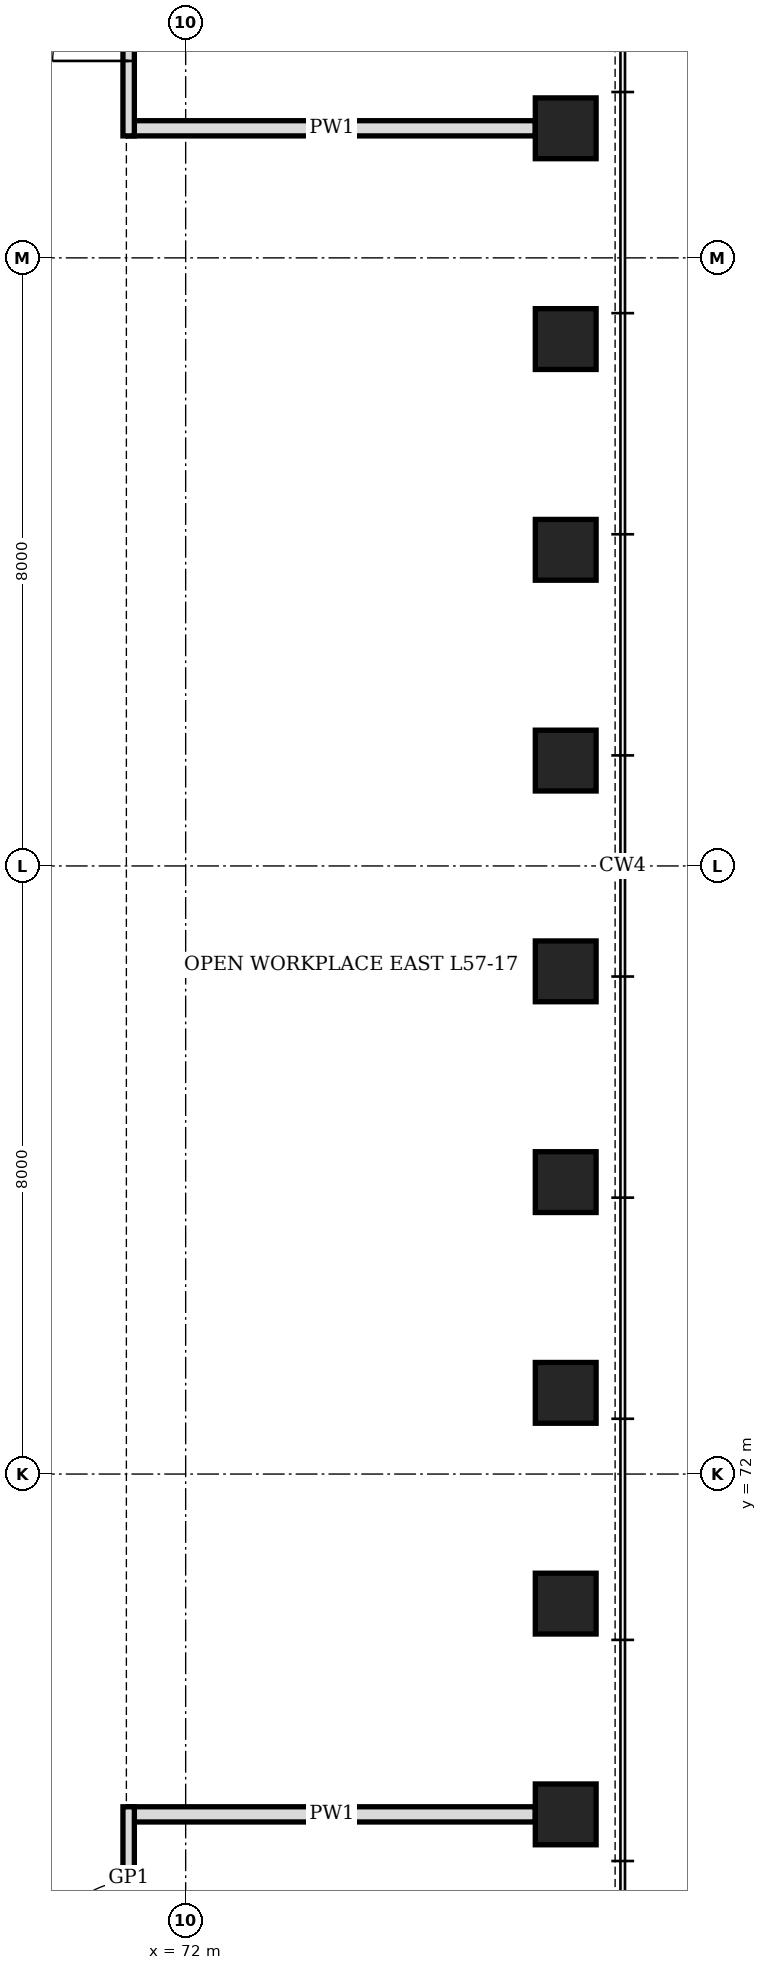
"""IFC4 building model, lengths in metres.
Left out: names, types, materials, properties, quantities, classifications, styles, units other than length and angle.
Written with IfcOpenShell. Run it as: python <this file> out.ifc"""

import sys

from ifc_helpers import new_model, si_unit, direction, frame, frame_2d, origin, origin_2d, place, context, subcontext, project, spatial, rectangle, hollow_rectangle, extrude, element, fill, save


model = new_model("IFC4")
c1 = context("Model", 3, precision=1e-05, world=origin(), true_north=direction((0.0, 1.0)))
c2 = subcontext(c1, "Body", "Model", "MODEL_VIEW")
j1 = project(units=[si_unit("LENGTHUNIT", "METRE"), si_unit("PLANEANGLEUNIT", "RADIAN")], contexts=[c1])
p1 = place(None, origin())
s1 = spatial("IfcSite", under=j1, at=p1, CompositionType="ELEMENT")
p2 = place(p1, origin())
s2 = spatial("IfcBuilding", under=s1, at=p2, CompositionType="ELEMENT")
p3 = place(p2, frame((0.0, 0.0, 254.5)))
s3 = spatial("IfcBuildingStorey", under=s2, at=p3, CompositionType="ELEMENT", Elevation=254.5)
for number, where, z_axis, x_axis in (
    (1, (77.0, 67.523, 0.0), (0.0, 0.0, 1.0), (0.0, 1.0, 0.0)),
    (2, (77.0, 70.295, 0.0), (0.0, 0.0, 1.0), (0.0, 1.0, 0.0)),
    (3, (77.0, 73.068, 0.0), (0.0, 0.0, 1.0), (0.0, 1.0, 0.0)),
    (4, (77.0, 75.841, 0.0), (0.0, 0.0, 1.0), (0.0, 1.0, 0.0)),
    (5, (77.0, 78.614, 0.0), (0.0, 0.0, 1.0), (0.0, 1.0, 0.0)),
    (6, (77.0, 81.386, 0.0), (0.0, 0.0, 1.0), (0.0, 1.0, 0.0)),
    (7, (77.0, 84.159, 0.0), (0.0, 0.0, 1.0), (0.0, 1.0, 0.0)),
    (8, (77.0, 86.932, 0.0), (0.0, 0.0, 1.0), (0.0, 1.0, 0.0)),
    (9, (77.0, 89.705, 0.0), (0.0, 0.0, 1.0), (0.0, 1.0, 0.0)),
):
    element("IfcColumn", number, at=place(p3, frame(where, z_axis=z_axis, x_axis=x_axis)), inside=s3, PredefinedType="COLUMN", context=c2, shape_type="SweptSolid", body=[
        extrude(hollow_rectangle(XDim=0.8, YDim=0.8, WallThickness=0.1, at=origin_2d()), origin(), (0.0, 0.0, 1.0), 4.2),
    ])
for number, where, z_axis, x_axis in (
    (10, (71.25, 67.523, 0.0), (0.0, 0.0, 1.0), (1.0, 0.0, 0.0)),
    (11, (71.25, 89.705, 0.0), (0.0, 0.0, 1.0), (1.0, 0.0, 0.0)),
):
    element("IfcWall", number, at=place(p3, frame(where, z_axis=z_axis, x_axis=x_axis)), inside=s3, PredefinedType="PARTITIONING", context=c2, shape_type="SweptSolid", body=[
        extrude(rectangle(XDim=5.35, YDim=0.2, at=frame_2d((2.675, 0.0))), origin(), (0.0, 0.0, 1.0), 3.428),
    ])
p4 = place(p3, frame((71.25, 65.15, 0.0), z_axis=(0.0, 0.0, 1.0), x_axis=(0.0, 1.0, 0.0)))
e12 = element("IfcWall", 12, at=p4, inside=s3, PredefinedType="PARTITIONING", context=c2, shape_type="SweptSolid", body=[
    extrude(rectangle(XDim=2.473, YDim=0.15, at=frame_2d((1.236, 0.0))), origin(), (0.0, 0.0, 1.0), 4.04),
])
p5 = place(p4, frame((0.486, 0.0, 0.0)))
e13 = element("IfcOpeningElement", 13, at=p5, cuts=e12, PredefinedType="OPENING", context=c2, shape_type="SweptSolid", body=[
    extrude(rectangle(XDim=1.0, YDim=2.4, at=frame_2d((0.5, 1.2))), frame((0.0, 0.085, 0.0), z_axis=(0.0, -1.0, 0.0), x_axis=(1.0, 0.0, 0.0)), (0.0, 0.0, 1.0), 0.17),
])
p6 = place(p3, frame((71.25, 89.604, 0.0), z_axis=(0.0, 0.0, 1.0), x_axis=(0.0, 1.0, 0.0)))
e14 = element("IfcWall", 14, at=p6, inside=s3, PredefinedType="PARTITIONING", context=c2, shape_type="SweptSolid", body=[
    extrude(rectangle(XDim=2.873, YDim=0.15, at=frame_2d((1.437, 0.0))), origin(), (0.0, 0.0, 1.0), 4.04),
])
p7 = place(p6, frame((0.986, 0.0, 0.0)))
e15 = element("IfcOpeningElement", 15, at=p7, cuts=e14, PredefinedType="OPENING", context=c2, shape_type="SweptSolid", body=[
    extrude(rectangle(XDim=1.0, YDim=2.4, at=frame_2d((0.5, 1.2))), frame((0.0, 0.085, 0.0), z_axis=(0.0, -1.0, 0.0), x_axis=(1.0, 0.0, 0.0)), (0.0, 0.0, 1.0), 0.17),
])
p8 = place(p5, origin())
e16 = element("IfcDoor", 16, at=p8, inside=s3, OperationType="SINGLE_SWING_RIGHT", PredefinedType="DOOR", context=c2, shape_type="SweptSolid", body=[
    extrude(rectangle(XDim=1.0, YDim=2.4, at=frame_2d((0.5, 1.2))), frame((0.0, 0.075, 0.0), z_axis=(0.0, -1.0, 0.0), x_axis=(1.0, 0.0, 0.0)), (0.0, 0.0, 1.0), 0.149),
])
fill(e13, e16)
p9 = place(p7, origin())
e17 = element("IfcDoor", 17, at=p9, inside=s3, OperationType="SINGLE_SWING_RIGHT", PredefinedType="DOOR", context=c2, shape_type="SweptSolid", body=[
    extrude(rectangle(XDim=1.0, YDim=2.4, at=frame_2d((0.5, 1.2))), frame((0.0, 0.075, 0.0), z_axis=(0.0, -1.0, 0.0), x_axis=(1.0, 0.0, 0.0)), (0.0, 0.0, 1.0), 0.149),
])
fill(e15, e17)
save(model, sys.argv[1])
